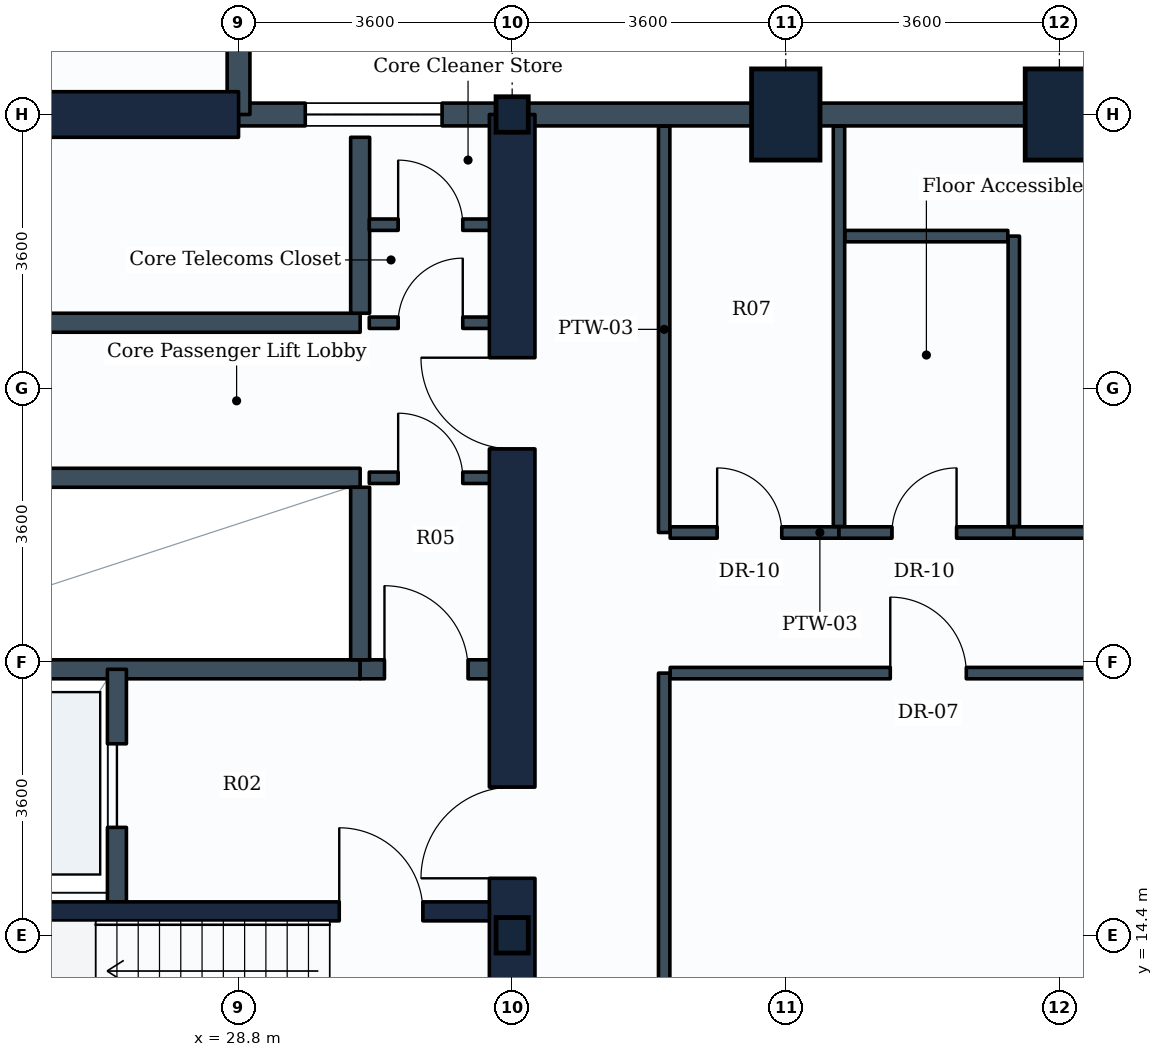
"""IFC4 building model, lengths in metres.
Left out: names, types, materials, properties, quantities, classifications, styles, units other than length and angle.
Written with IfcOpenShell. Run it as: python <this file> out.ifc"""

import sys

from ifc_helpers import new_model, si_unit, direction, frame, frame_2d, origin, origin_2d, place, context, subcontext, project, spatial, rectangle, i_section, extrude, element, fill, save


model = new_model("IFC4")
c1 = context("Model", 3, precision=1e-05, world=origin(), true_north=direction((0.0, 1.0)))
c2 = subcontext(c1, "Body", "Model", "MODEL_VIEW")
j1 = project(units=[si_unit("LENGTHUNIT", "METRE"), si_unit("PLANEANGLEUNIT", "RADIAN")], contexts=[c1])
p1 = place(None, origin())
s1 = spatial("IfcSite", under=j1, at=p1, CompositionType="ELEMENT")
p2 = place(p1, origin())
s2 = spatial("IfcBuilding", under=s1, at=p2, CompositionType="ELEMENT")
p3 = place(p2, frame((0.0, 0.0, 47.4)))
s3 = spatial("IfcBuildingStorey", under=s2, at=p3, CompositionType="ELEMENT", Elevation=47.4)
for number, where, z_axis, x_axis in (
    (1, (32.4, 14.4, 0.0), (0.0, 0.0, 1.0), (1.0, 0.0, 0.0)),
    (2, (32.4, 25.2, 0.0), (0.0, 0.0, 1.0), (1.0, 0.0, 0.0)),
):
    element("IfcColumn", number, at=place(p3, frame(where, z_axis=z_axis, x_axis=x_axis)), inside=s3, PredefinedType="COLUMN", context=c2, shape_type="SweptSolid", body=[
        extrude(i_section(OverallWidth=0.424, OverallDepth=0.467, WebThickness=0.033, FlangeThickness=0.053, FilletRadius=0.015, at=origin_2d()), origin(), (0.0, 0.0, 1.0), 3.9),
    ])
for number, where, z_axis, x_axis in (
    (3, (36.0, 25.2, 0.0), (0.0, 0.0, 1.0), (1.0, 0.0, 0.0)),
    (4, (39.6, 25.2, 0.0), (0.0, 0.0, 1.0), (1.0, 0.0, 0.0)),
):
    element("IfcColumn", number, at=place(p3, frame(where, z_axis=z_axis, x_axis=x_axis)), inside=s3, PredefinedType="COLUMN", context=c2, shape_type="SweptSolid", body=[
        extrude(rectangle(XDim=0.9, YDim=1.2, at=origin_2d()), origin(), (0.0, 0.0, 1.0), 3.9),
    ])
p4 = place(p3, frame((39.6, 25.2, 0.0), z_axis=(0.0, 0.0, 1.0), x_axis=(1.0, 0.0, 0.0)))
e5 = element("IfcWall", 5, at=p4, inside=s3, PredefinedType="STANDARD", context=c2, shape_type="SweptSolid", body=[
    extrude(rectangle(XDim=3.6, YDim=0.3, at=frame_2d((1.8, 0.0))), origin(), (0.0, 0.0, 1.0), 2.93),
])
p5 = place(p4, frame((0.9, 0.0, 0.85)))
e6 = element("IfcOpeningElement", 6, at=p5, cuts=e5, PredefinedType="OPENING", context=c2, shape_type="SweptSolid", body=[
    extrude(rectangle(XDim=1.8, YDim=1.35, at=frame_2d((0.9, 0.675))), frame((0.0, 0.16, 0.0), z_axis=(0.0, -1.0, 0.0), x_axis=(1.0, 0.0, 0.0)), (0.0, 0.0, 1.0), 0.32),
])
for number, where, z_axis, x_axis in (
    (7, (36.0, 25.2, 0.0), (0.0, 0.0, 1.0), (1.0, 0.0, 0.0)),
    (8, (32.4, 25.2, 0.0), (0.0, 0.0, 1.0), (1.0, 0.0, 0.0)),
):
    element("IfcWall", number, at=place(p3, frame(where, z_axis=z_axis, x_axis=x_axis)), inside=s3, PredefinedType="STANDARD", context=c2, shape_type="SweptSolid", body=[
        extrude(rectangle(XDim=3.6, YDim=0.3, at=frame_2d((1.8, 0.0))), origin(), (0.0, 0.0, 1.0), 2.93),
    ])
p6 = place(p3, frame((28.8, 25.2, 0.0), z_axis=(0.0, 0.0, 1.0), x_axis=(1.0, 0.0, 0.0)))
e9 = element("IfcWall", 9, at=p6, inside=s3, PredefinedType="STANDARD", context=c2, shape_type="SweptSolid", body=[
    extrude(rectangle(XDim=3.6, YDim=0.3, at=frame_2d((1.8, 0.0))), origin(), (0.0, 0.0, 1.0), 3.635),
])
p7 = place(p6, frame((0.878, 0.0, 0.85)))
e10 = element("IfcOpeningElement", 10, at=p7, cuts=e9, PredefinedType="OPENING", context=c2, shape_type="SweptSolid", body=[
    extrude(rectangle(XDim=1.8, YDim=1.35, at=frame_2d((0.9, 0.675))), frame((0.0, 0.16, 0.0), z_axis=(0.0, -1.0, 0.0), x_axis=(1.0, 0.0, 0.0)), (0.0, 0.0, 1.0), 0.32),
])
p8 = place(p3, frame((28.8, 25.2, 0.0), z_axis=(0.0, 0.0, 1.0), x_axis=(0.0, 1.0, 0.0)))
e11 = element("IfcWall", 11, at=p8, inside=s3, PredefinedType="STANDARD", context=c2, shape_type="SweptSolid", body=[
    extrude(rectangle(XDim=3.6, YDim=0.3, at=frame_2d((1.8, 0.0))), origin(), (0.0, 0.0, 1.0), 3.14),
])
p9 = place(p3, frame((14.4, 25.2, 0.0), z_axis=(0.0, 0.0, 1.0), x_axis=(1.0, 0.0, 0.0)))
e12 = element("IfcWall", 12, at=p9, inside=s3, PredefinedType="SHEAR", context=c2, shape_type="SweptSolid", body=[
    extrude(rectangle(XDim=14.4, YDim=0.6, at=frame_2d((7.2, 0.0))), origin(), (0.0, 0.0, 1.0), 3.65),
])
p10 = place(p3, frame((32.4, 10.8, 0.0), z_axis=(0.0, 0.0, 1.0), x_axis=(0.0, 1.0, 0.0)))
e13 = element("IfcWall", 13, at=p10, inside=s3, PredefinedType="SHEAR", context=c2, shape_type="SweptSolid", body=[
    extrude(rectangle(XDim=14.4, YDim=0.6, at=frame_2d((7.2, 0.0))), origin(), (0.0, 0.0, 1.0), 3.65),
])
p11 = place(p10, frame((4.35, 0.0, 0.0)))
e14 = element("IfcOpeningElement", 14, at=p11, cuts=e13, PredefinedType="OPENING", context=c2, shape_type="SweptSolid", body=[
    extrude(rectangle(XDim=1.2, YDim=2.1, at=frame_2d((0.6, 1.05))), frame((0.0, 0.31, 0.0), z_axis=(0.0, -1.0, 0.0), x_axis=(1.0, 0.0, 0.0)), (0.0, 0.0, 1.0), 0.62),
])
p12 = place(p10, frame((10.0, 0.0, 0.0)))
e15 = element("IfcOpeningElement", 15, at=p12, cuts=e13, PredefinedType="OPENING", context=c2, shape_type="SweptSolid", body=[
    extrude(rectangle(XDim=1.2, YDim=2.1, at=frame_2d((0.6, 1.05))), frame((0.0, 0.31, 0.0), z_axis=(0.0, -1.0, 0.0), x_axis=(1.0, 0.0, 0.0)), (0.0, 0.0, 1.0), 0.62),
])
p13 = place(p3, frame((23.35, 14.715, 0.0), z_axis=(0.0, 0.0, 1.0), x_axis=(1.0, 0.0, 0.0)))
e16 = element("IfcWall", 16, at=p13, inside=s3, PredefinedType="SHEAR", context=c2, shape_type="SweptSolid", body=[
    extrude(rectangle(XDim=8.75, YDim=0.25, at=frame_2d((4.375, 0.0))), origin(), (0.0, 0.0, 1.0), 3.65),
])
p14 = place(p13, frame((6.775, 0.0, 0.0)))
e17 = element("IfcOpeningElement", 17, at=p14, cuts=e16, PredefinedType="OPENING", context=c2, shape_type="SweptSolid", body=[
    extrude(rectangle(XDim=1.1, YDim=2.1, at=frame_2d((0.55, 1.05))), frame((0.0, 0.135, 0.0), z_axis=(0.0, -1.0, 0.0), x_axis=(1.0, 0.0, 0.0)), (0.0, 0.0, 1.0), 0.27),
])
p15 = place(p3, frame((21.88, 17.9, 0.0), z_axis=(0.0, 0.0, 1.0), x_axis=(1.0, 0.0, 0.0)))
e18 = element("IfcWall", 18, at=p15, inside=s3, PredefinedType="PARTITIONING", context=c2, shape_type="SweptSolid", body=[
    extrude(rectangle(XDim=8.52, YDim=0.25, at=frame_2d((4.26, 0.0))), origin(), (0.0, 0.0, 1.0), 3.635),
])
p16 = place(p3, frame((30.4, 17.9, 0.0), z_axis=(0.0, 0.0, 1.0), x_axis=(1.0, 0.0, 0.0)))
e19 = element("IfcWall", 19, at=p16, inside=s3, PredefinedType="PARTITIONING", context=c2, shape_type="SweptSolid", body=[
    extrude(rectangle(XDim=1.75, YDim=0.25, at=frame_2d((0.875, 0.0))), origin(), (0.0, 0.0, 1.0), 3.635),
])
p17 = place(p16, frame((0.32, 0.0, 0.0)))
e20 = element("IfcOpeningElement", 20, at=p17, cuts=e19, PredefinedType="OPENING", context=c2, shape_type="SweptSolid", body=[
    extrude(rectangle(XDim=1.1, YDim=2.1, at=frame_2d((0.55, 1.05))), frame((0.0, 0.135, 0.0), z_axis=(0.0, -1.0, 0.0), x_axis=(1.0, 0.0, 0.0)), (0.0, 0.0, 1.0), 0.27),
])
p18 = place(p3, frame((27.2, 14.84, 0.0), z_axis=(0.0, 0.0, 1.0), x_axis=(0.0, 1.0, 0.0)))
e21 = element("IfcWall", 21, at=p18, inside=s3, PredefinedType="PARTITIONING", context=c2, shape_type="SweptSolid", body=[
    extrude(rectangle(XDim=3.06, YDim=0.25, at=frame_2d((1.53, 0.0))), origin(), (0.0, 0.0, 1.0), 3.635),
])
p19 = place(p18, frame((0.98, 0.0, 0.0)))
e22 = element("IfcOpeningElement", 22, at=p19, cuts=e21, PredefinedType="OPENING", context=c2, shape_type="SweptSolid", body=[
    extrude(rectangle(XDim=1.1, YDim=2.1, at=frame_2d((0.55, 1.05))), frame((0.0, 0.135, 0.0), z_axis=(0.0, -1.0, 0.0), x_axis=(1.0, 0.0, 0.0)), (0.0, 0.0, 1.0), 0.27),
])
p20 = place(p3, frame((23.18, 20.42, 0.0), z_axis=(0.0, 0.0, 1.0), x_axis=(1.0, 0.0, 0.0)))
e23 = element("IfcWall", 23, at=p20, inside=s3, PredefinedType="PARTITIONING", context=c2, shape_type="SweptSolid", body=[
    extrude(rectangle(XDim=7.22, YDim=0.25, at=frame_2d((3.61, 0.0))), origin(), (0.0, 0.0, 1.0), 3.635),
])
p21 = place(p3, frame((30.4, 18.025, 0.0), z_axis=(0.0, 0.0, 1.0), x_axis=(0.0, 1.0, 0.0)))
e24 = element("IfcWall", 24, at=p21, inside=s3, PredefinedType="PARTITIONING", context=c2, shape_type="SweptSolid", body=[
    extrude(rectangle(XDim=2.27, YDim=0.25, at=frame_2d((1.135, 0.0))), origin(), (0.0, 0.0, 1.0), 3.635),
])
p22 = place(p3, frame((23.18, 22.46, 0.0), z_axis=(0.0, 0.0, 1.0), x_axis=(1.0, 0.0, 0.0)))
e25 = element("IfcWall", 25, at=p22, inside=s3, PredefinedType="PARTITIONING", context=c2, shape_type="SweptSolid", body=[
    extrude(rectangle(XDim=7.22, YDim=0.25, at=frame_2d((3.61, 0.0))), origin(), (0.0, 0.0, 1.0), 3.635),
])
p23 = place(p3, frame((30.4, 22.585, 0.0), z_axis=(0.0, 0.0, 1.0), x_axis=(0.0, 1.0, 0.0)))
e26 = element("IfcWall", 26, at=p23, inside=s3, PredefinedType="PARTITIONING", context=c2, shape_type="SweptSolid", body=[
    extrude(rectangle(XDim=2.315, YDim=0.25, at=frame_2d((1.157, 0.0))), origin(), (0.0, 0.0, 1.0), 3.635),
])
p24 = place(p3, frame((30.52, 22.46, 0.0), z_axis=(0.0, 0.0, 1.0), x_axis=(1.0, 0.0, 0.0)))
e27 = element("IfcWall", 27, at=p24, inside=s3, PredefinedType="PARTITIONING", context=c2, shape_type="SweptSolid", body=[
    extrude(rectangle(XDim=1.63, YDim=0.15, at=frame_2d((0.815, 0.0))), origin(), (0.0, 0.0, 1.0), 3.635),
])
p25 = place(p24, frame((0.38, 0.0, 0.0)))
e28 = element("IfcOpeningElement", 28, at=p25, cuts=e27, PredefinedType="OPENING", context=c2, shape_type="SweptSolid", body=[
    extrude(rectangle(XDim=0.85, YDim=2.1, at=frame_2d((0.425, 1.05))), frame((0.0, 0.085, 0.0), z_axis=(0.0, -1.0, 0.0), x_axis=(1.0, 0.0, 0.0)), (0.0, 0.0, 1.0), 0.17),
])
p26 = place(p3, frame((30.52, 23.75, 0.0), z_axis=(0.0, 0.0, 1.0), x_axis=(1.0, 0.0, 0.0)))
e29 = element("IfcWall", 29, at=p26, inside=s3, PredefinedType="PARTITIONING", context=c2, shape_type="SweptSolid", body=[
    extrude(rectangle(XDim=1.63, YDim=0.15, at=frame_2d((0.815, 0.0))), origin(), (0.0, 0.0, 1.0), 3.635),
])
p27 = place(p26, frame((0.38, 0.0, 0.0)))
e30 = element("IfcOpeningElement", 30, at=p27, cuts=e29, PredefinedType="OPENING", context=c2, shape_type="SweptSolid", body=[
    extrude(rectangle(XDim=0.85, YDim=2.1, at=frame_2d((0.425, 1.05))), frame((0.0, 0.085, 0.0), z_axis=(0.0, -1.0, 0.0), x_axis=(1.0, 0.0, 0.0)), (0.0, 0.0, 1.0), 0.17),
])
p28 = place(p3, frame((30.52, 20.42, 0.0), z_axis=(0.0, 0.0, 1.0), x_axis=(1.0, 0.0, 0.0)))
e31 = element("IfcWall", 31, at=p28, inside=s3, PredefinedType="PARTITIONING", context=c2, shape_type="SweptSolid", body=[
    extrude(rectangle(XDim=1.63, YDim=0.15, at=frame_2d((0.815, 0.0))), origin(), (0.0, 0.0, 1.0), 3.635),
])
p29 = place(p28, frame((0.38, 0.0, 0.0)))
e32 = element("IfcOpeningElement", 32, at=p29, cuts=e31, PredefinedType="OPENING", context=c2, shape_type="SweptSolid", body=[
    extrude(rectangle(XDim=0.85, YDim=2.1, at=frame_2d((0.425, 1.05))), frame((0.0, 0.085, 0.0), z_axis=(0.0, -1.0, 0.0), x_axis=(1.0, 0.0, 0.0)), (0.0, 0.0, 1.0), 0.17),
])
p30 = place(p3, frame((34.4, 19.7, 0.0), z_axis=(0.0, 0.0, 1.0), x_axis=(0.0, 1.0, 0.0)))
e33 = element("IfcWall", 33, at=p30, inside=s3, PredefinedType="PARTITIONING", context=c2, shape_type="SweptSolid", body=[
    extrude(rectangle(XDim=5.346, YDim=0.15, at=frame_2d((2.673, 0.0))), origin(), (0.0, 0.0, 1.0), 2.93),
])
p31 = place(p3, frame((34.479, 19.7, 0.0), z_axis=(0.0, 0.0, 1.0), x_axis=(1.0, 0.0, 0.0)))
e34 = element("IfcWall", 34, at=p31, inside=s3, PredefinedType="PARTITIONING", context=c2, shape_type="SweptSolid", body=[
    extrude(rectangle(XDim=2.221, YDim=0.15, at=frame_2d((1.11, 0.0))), origin(), (0.0, 0.0, 1.0), 3.08),
])
p32 = place(p31, frame((0.618, 0.0, 0.0)))
e35 = element("IfcOpeningElement", 35, at=p32, cuts=e34, PredefinedType="OPENING", context=c2, shape_type="SweptSolid", body=[
    extrude(rectangle(XDim=0.85, YDim=2.1, at=frame_2d((0.425, 1.05))), frame((0.0, 0.085, 0.0), z_axis=(0.0, -1.0, 0.0), x_axis=(1.0, 0.0, 0.0)), (0.0, 0.0, 1.0), 0.17),
])
p33 = place(p3, frame((36.7, 19.779, 0.0), z_axis=(0.0, 0.0, 1.0), x_axis=(0.0, 1.0, 0.0)))
e36 = element("IfcWall", 36, at=p33, inside=s3, PredefinedType="PARTITIONING", context=c2, shape_type="SweptSolid", body=[
    extrude(rectangle(XDim=5.267, YDim=0.15, at=frame_2d((2.633, 0.0))), origin(), (0.0, 0.0, 1.0), 2.93),
])
p34 = place(p3, frame((36.7, 19.7, 0.0), z_axis=(0.0, 0.0, 1.0), x_axis=(1.0, 0.0, 0.0)))
e37 = element("IfcWall", 37, at=p34, inside=s3, PredefinedType="PARTITIONING", context=c2, shape_type="SweptSolid", body=[
    extrude(rectangle(XDim=2.3, YDim=0.15, at=frame_2d((1.15, 0.0))), origin(), (0.0, 0.0, 1.0), 3.635),
])
p35 = place(p34, frame((0.697, 0.0, 0.0)))
e38 = element("IfcOpeningElement", 38, at=p35, cuts=e37, PredefinedType="OPENING", context=c2, shape_type="SweptSolid", body=[
    extrude(rectangle(XDim=0.85, YDim=2.1, at=frame_2d((0.425, 1.05))), frame((0.0, 0.085, 0.0), z_axis=(0.0, -1.0, 0.0), x_axis=(1.0, 0.0, 0.0)), (0.0, 0.0, 1.0), 0.17),
])
p36 = place(p3, frame((39.0, 19.779, 0.0), z_axis=(0.0, 0.0, 1.0), x_axis=(0.0, 1.0, 0.0)))
e39 = element("IfcWall", 39, at=p36, inside=s3, PredefinedType="PARTITIONING", context=c2, shape_type="SweptSolid", body=[
    extrude(rectangle(XDim=3.821, YDim=0.15, at=frame_2d((1.911, 0.0))), origin(), (0.0, 0.0, 1.0), 3.03),
])
p37 = place(p3, frame((36.779, 23.6, 0.0), z_axis=(0.0, 0.0, 1.0), x_axis=(1.0, 0.0, 0.0)))
e40 = element("IfcWall", 40, at=p37, inside=s3, PredefinedType="PARTITIONING", context=c2, shape_type="SweptSolid", body=[
    extrude(rectangle(XDim=2.142, YDim=0.15, at=frame_2d((1.071, 0.0))), origin(), (0.0, 0.0, 1.0), 3.635),
])
p38 = place(p3, frame((34.4, 3.754, 0.0), z_axis=(0.0, 0.0, 1.0), x_axis=(0.0, 1.0, 0.0)))
e41 = element("IfcWall", 41, at=p38, inside=s3, PredefinedType="PARTITIONING", context=c2, shape_type="SweptSolid", body=[
    extrude(rectangle(XDim=14.096, YDim=0.15, at=frame_2d((7.048, 0.0))), origin(), (0.0, 0.0, 1.0), 2.93),
])
p39 = place(p3, frame((34.479, 17.85, 0.0), z_axis=(0.0, 0.0, 1.0), x_axis=(1.0, 0.0, 0.0)))
e42 = element("IfcWall", 42, at=p39, inside=s3, PredefinedType="PARTITIONING", context=c2, shape_type="SweptSolid", body=[
    extrude(rectangle(XDim=6.792, YDim=0.15, at=frame_2d((3.396, 0.0))), origin(), (0.0, 0.0, 1.0), 3.04),
])
p40 = place(p39, frame((2.896, 0.0, 0.0)))
e43 = element("IfcOpeningElement", 43, at=p40, cuts=e42, PredefinedType="OPENING", context=c2, shape_type="SweptSolid", body=[
    extrude(rectangle(XDim=1.0, YDim=2.1, at=frame_2d((0.5, 1.05))), frame((0.0, 0.085, 0.0), z_axis=(0.0, -1.0, 0.0), x_axis=(1.0, 0.0, 0.0)), (0.0, 0.0, 1.0), 0.17),
])
p41 = place(p3, frame((39.0, 19.7, 0.0), z_axis=(0.0, 0.0, 1.0), x_axis=(1.0, 0.0, 0.0)))
e44 = element("IfcWall", 44, at=p41, inside=s3, PredefinedType="PARTITIONING", context=c2, shape_type="SweptSolid", body=[
    extrude(rectangle(XDim=8.321, YDim=0.15, at=frame_2d((4.161, 0.0))), origin(), (0.0, 0.0, 1.0), 3.04),
])
p42 = place(p41, frame((3.7, 0.0, 0.0)))
e45 = element("IfcOpeningElement", 45, at=p42, cuts=e44, PredefinedType="OPENING", context=c2, shape_type="SweptSolid", body=[
    extrude(rectangle(XDim=1.0, YDim=2.1, at=frame_2d((0.5, 1.05))), frame((0.0, 0.085, 0.0), z_axis=(0.0, -1.0, 0.0), x_axis=(1.0, 0.0, 0.0)), (0.0, 0.0, 1.0), 0.17),
])
p43 = place(p7, origin())
e46 = element("IfcWindow", 46, at=p43, inside=s3, PartitioningType="SINGLE_PANEL", PredefinedType="WINDOW", context=c2, shape_type="SweptSolid", body=[
    extrude(rectangle(XDim=1.8, YDim=1.35, at=frame_2d((0.9, 0.675))), frame((0.0, 0.03, 0.0), z_axis=(0.0, -1.0, 0.0), x_axis=(1.0, 0.0, 0.0)), (0.0, 0.0, 1.0), 0.06),
])
fill(e10, e46)
p44 = place(p14, origin())
e47 = element("IfcDoor", 47, at=p44, inside=s3, OperationType="SINGLE_SWING_LEFT", PredefinedType="DOOR", context=c2, shape_type="SweptSolid", body=[
    extrude(rectangle(XDim=1.1, YDim=2.1, at=frame_2d((0.55, 1.05))), frame((0.0, 0.025, 0.0), z_axis=(0.0, -1.0, 0.0), x_axis=(1.0, 0.0, 0.0)), (0.0, 0.0, 1.0), 0.05),
])
fill(e17, e47)
p45 = place(p19, origin())
e48 = element("IfcDoor", 48, at=p45, inside=s3, OperationType="SLIDING_TO_LEFT", PredefinedType="DOOR", context=c2, shape_type="SweptSolid", body=[
    extrude(rectangle(XDim=1.1, YDim=2.1, at=frame_2d((0.55, 1.05))), frame((0.0, 0.025, 0.0), z_axis=(0.0, -1.0, 0.0), x_axis=(1.0, 0.0, 0.0)), (0.0, 0.0, 1.0), 0.05),
])
fill(e22, e48)
p46 = place(p11, origin())
e49 = element("IfcDoor", 49, at=p46, inside=s3, OperationType="SINGLE_SWING_LEFT", PredefinedType="DOOR", context=c2, shape_type="SweptSolid", body=[
    extrude(rectangle(XDim=1.2, YDim=2.1, at=frame_2d((0.6, 1.05))), frame((0.0, 0.025, 0.0), z_axis=(0.0, -1.0, 0.0), x_axis=(1.0, 0.0, 0.0)), (0.0, 0.0, 1.0), 0.05),
])
fill(e14, e49)
p47 = place(p17, origin())
e50 = element("IfcDoor", 50, at=p47, inside=s3, OperationType="SINGLE_SWING_LEFT", PredefinedType="DOOR", context=c2, shape_type="SweptSolid", body=[
    extrude(rectangle(XDim=1.1, YDim=2.1, at=frame_2d((0.55, 1.05))), frame((0.0, 0.025, 0.0), z_axis=(0.0, -1.0, 0.0), x_axis=(1.0, 0.0, 0.0)), (0.0, 0.0, 1.0), 0.05),
])
fill(e20, e50)
p48 = place(p12, origin())
e51 = element("IfcDoor", 51, at=p48, inside=s3, OperationType="SINGLE_SWING_RIGHT", PredefinedType="DOOR", context=c2, shape_type="SweptSolid", body=[
    extrude(rectangle(XDim=1.2, YDim=2.1, at=frame_2d((0.6, 1.05))), frame((0.0, 0.025, 0.0), z_axis=(0.0, -1.0, 0.0), x_axis=(1.0, 0.0, 0.0)), (0.0, 0.0, 1.0), 0.05),
])
fill(e15, e51)
p49 = place(p25, origin())
e52 = element("IfcDoor", 52, at=p49, inside=s3, OperationType="SINGLE_SWING_RIGHT", PredefinedType="DOOR", context=c2, shape_type="SweptSolid", body=[
    extrude(rectangle(XDim=0.85, YDim=2.1, at=frame_2d((0.425, 1.05))), frame((0.0, 0.025, 0.0), z_axis=(0.0, -1.0, 0.0), x_axis=(1.0, 0.0, 0.0)), (0.0, 0.0, 1.0), 0.05),
])
fill(e28, e52)
p50 = place(p27, origin())
e53 = element("IfcDoor", 53, at=p50, inside=s3, OperationType="SINGLE_SWING_LEFT", PredefinedType="DOOR", context=c2, shape_type="SweptSolid", body=[
    extrude(rectangle(XDim=0.85, YDim=2.1, at=frame_2d((0.425, 1.05))), frame((0.0, 0.025, 0.0), z_axis=(0.0, -1.0, 0.0), x_axis=(1.0, 0.0, 0.0)), (0.0, 0.0, 1.0), 0.05),
])
fill(e30, e53)
p51 = place(p29, origin())
e54 = element("IfcDoor", 54, at=p51, inside=s3, OperationType="SINGLE_SWING_LEFT", PredefinedType="DOOR", context=c2, shape_type="SweptSolid", body=[
    extrude(rectangle(XDim=0.85, YDim=2.1, at=frame_2d((0.425, 1.05))), frame((0.0, 0.025, 0.0), z_axis=(0.0, -1.0, 0.0), x_axis=(1.0, 0.0, 0.0)), (0.0, 0.0, 1.0), 0.05),
])
fill(e32, e54)
p52 = place(p32, origin())
e55 = element("IfcDoor", 55, at=p52, inside=s3, OperationType="SINGLE_SWING_LEFT", PredefinedType="DOOR", context=c2, shape_type="SweptSolid", body=[
    extrude(rectangle(XDim=0.85, YDim=2.1, at=frame_2d((0.425, 1.05))), frame((0.0, 0.025, 0.0), z_axis=(0.0, -1.0, 0.0), x_axis=(1.0, 0.0, 0.0)), (0.0, 0.0, 1.0), 0.05),
])
fill(e35, e55)
p53 = place(p35, origin())
e56 = element("IfcDoor", 56, at=p53, inside=s3, OperationType="SINGLE_SWING_RIGHT", PredefinedType="DOOR", context=c2, shape_type="SweptSolid", body=[
    extrude(rectangle(XDim=0.85, YDim=2.1, at=frame_2d((0.425, 1.05))), frame((0.0, 0.025, 0.0), z_axis=(0.0, -1.0, 0.0), x_axis=(1.0, 0.0, 0.0)), (0.0, 0.0, 1.0), 0.05),
])
fill(e38, e56)
p54 = place(p40, origin())
e57 = element("IfcDoor", 57, at=p54, inside=s3, OperationType="SINGLE_SWING_LEFT", PredefinedType="DOOR", context=c2, shape_type="SweptSolid", body=[
    extrude(rectangle(XDim=1.0, YDim=2.1, at=frame_2d((0.5, 1.05))), frame((0.0, 0.025, 0.0), z_axis=(0.0, -1.0, 0.0), x_axis=(1.0, 0.0, 0.0)), (0.0, 0.0, 1.0), 0.05),
])
fill(e43, e57)
save(model, sys.argv[1])
